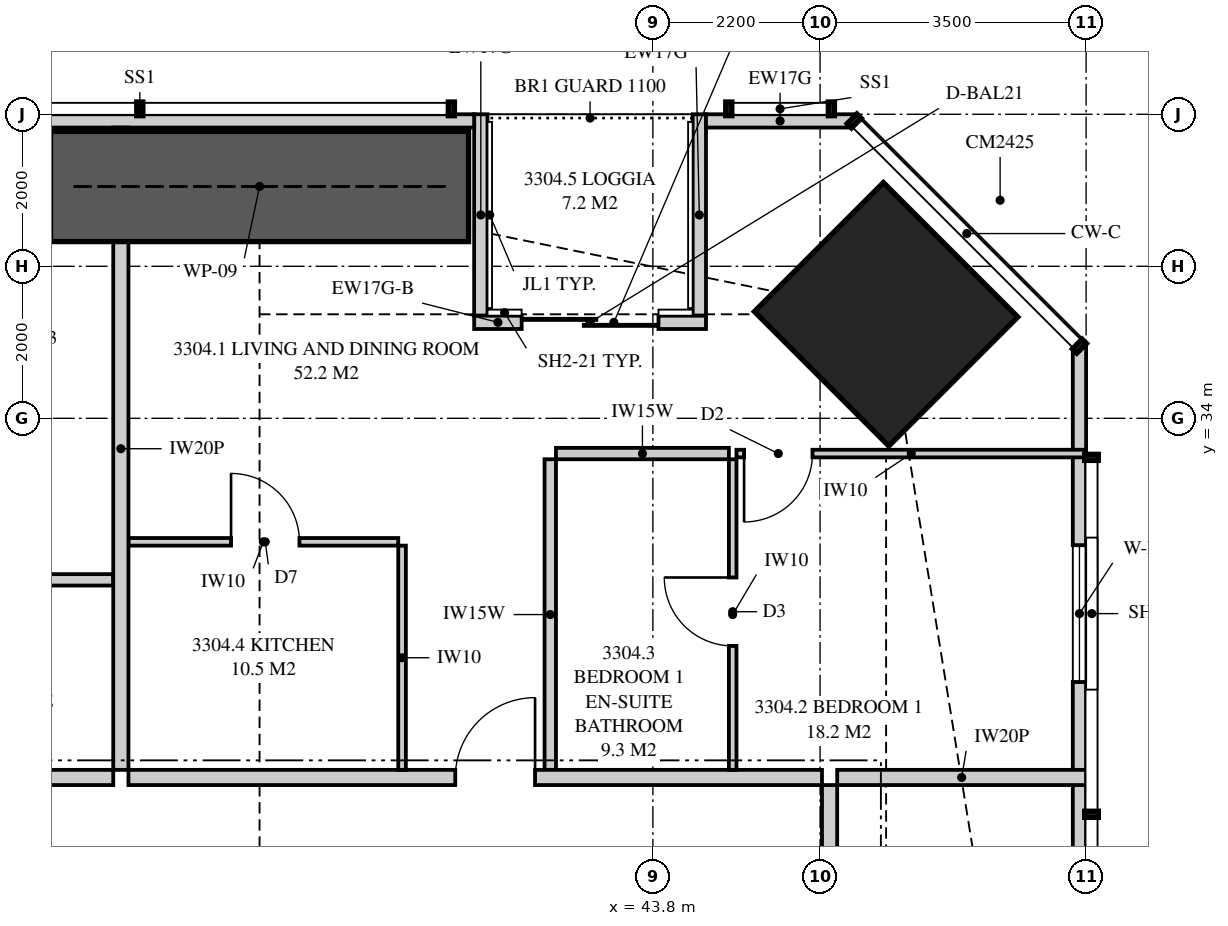
"""IFC4 building model, lengths in metres.
Left out: names, types, materials, properties, quantities, classifications, styles, units other than length and angle.
Written with IfcOpenShell. Run it as: python <this file> out.ifc"""

import sys

from ifc_helpers import new_model, si_unit, direction, frame, frame_2d, origin, origin_2d, place, context, subcontext, project, spatial, polyline, rectangle, outline, extrude, element, fill, save


model = new_model("IFC4")
c1 = context("Model", 3, precision=1e-05, world=origin(), true_north=direction((0.0, 1.0)))
c2 = subcontext(c1, "Body", "Model", "MODEL_VIEW")
j1 = project(units=[si_unit("LENGTHUNIT", "METRE"), si_unit("PLANEANGLEUNIT", "RADIAN")], contexts=[c1])
p1 = place(None, origin())
s1 = spatial("IfcSite", under=j1, at=p1, CompositionType="ELEMENT")
p2 = place(p1, origin())
s2 = spatial("IfcBuilding", under=s1, at=p2, CompositionType="ELEMENT")
p3 = place(p2, frame((0.0, 0.0, 121.6)))
s3 = spatial("IfcBuildingStorey", under=s2, at=p3, CompositionType="ELEMENT", Elevation=121.6)
p4 = place(p3, frame((46.869, 35.369, 0.0), z_axis=(0.0, 0.0, 1.0), x_axis=(-0.707106781187, -0.707106781187, 0.0)))
e1 = element("IfcColumn", 1, at=p4, inside=s3, PredefinedType="COLUMN", context=c2, shape_type="SweptSolid", body=[
    extrude(rectangle(XDim=2.4, YDim=2.5, at=origin_2d()), origin(), (0.0, 0.0, 1.0), 3.35),
])
p5 = place(p3, frame((49.413, 3.051, 0.0), z_axis=(0.0, 0.0, 1.0), x_axis=(0.0, 1.0, 0.0)))
e2 = element("IfcWall", 2, at=p5, inside=s3, PredefinedType="SOLIDWALL", context=c2, shape_type="SweptSolid", body=[
    extrude(outline(polyline([(0.0, 0.0), (31.897, 0.0), (31.897, 3.11), (22.167, 3.11), (22.167, 2.15), (22.074, 2.15), (22.074, 3.11), (21.949, 3.11), (21.949, 2.15), (9.949, 2.15), (9.949, 3.11), (9.823, 3.11), (9.823, 2.15), (9.73, 2.15), (9.73, 3.11), (0.0, 3.11), (0.0, 0.0)])), frame((0.0, 0.087, 0.0), z_axis=(0.0, -1.0, 0.0), x_axis=(1.0, 0.0, 0.0)), (0.0, 0.0, 1.0), 0.175),
])
p6 = place(p5, frame((2.118, 0.0, 0.4)))
e3 = element("IfcOpeningElement", 3, at=p6, cuts=e2, PredefinedType="OPENING", context=c2, shape_type="SweptSolid", body=[
    extrude(rectangle(XDim=1.8, YDim=1.7, at=frame_2d((0.9, 0.85))), frame((0.0, 0.097, 0.0), z_axis=(0.0, -1.0, 0.0), x_axis=(1.0, 0.0, 0.0)), (0.0, 0.0, 1.0), 0.195),
])
p7 = place(p5, frame((14.849, 0.0, 0.4)))
e4 = element("IfcOpeningElement", 4, at=p7, cuts=e2, PredefinedType="OPENING", context=c2, shape_type="SweptSolid", body=[
    extrude(rectangle(XDim=1.2, YDim=1.7, at=frame_2d((0.6, 0.85))), frame((0.0, 0.097, 0.0), z_axis=(0.0, -1.0, 0.0), x_axis=(1.0, 0.0, 0.0)), (0.0, 0.0, 1.0), 0.195),
])
p8 = place(p5, frame((27.479, 0.0, 0.4)))
e5 = element("IfcOpeningElement", 5, at=p8, cuts=e2, PredefinedType="OPENING", context=c2, shape_type="SweptSolid", body=[
    extrude(rectangle(XDim=1.8, YDim=1.7, at=frame_2d((0.9, 0.85))), frame((0.0, 0.097, 0.0), z_axis=(0.0, -1.0, 0.0), x_axis=(1.0, 0.0, 0.0)), (0.0, 0.0, 1.0), 0.195),
])
p9 = place(p3, frame((46.449, 37.913, 0.0), z_axis=(0.0, 0.0, 1.0), x_axis=(-1.0, 0.0, 0.0)))
e6 = element("IfcWall", 6, at=p9, inside=s3, PredefinedType="SOLIDWALL", context=c2, shape_type="SweptSolid", body=[
    extrude(rectangle(XDim=1.95, YDim=0.175, at=frame_2d((0.975, 0.0))), origin(), (0.0, 0.0, 1.0), 3.11),
])
p10 = place(p3, frame((41.449, 37.913, 0.0), z_axis=(0.0, 0.0, 1.0), x_axis=(-1.0, 0.0, 0.0)))
e7 = element("IfcWall", 7, at=p10, inside=s3, PredefinedType="SOLIDWALL", context=c2, shape_type="SweptSolid", body=[
    extrude(outline(polyline([(0.0, 0.0), (27.374, 0.0), (27.374, 3.11), (24.777, 3.11), (24.777, 2.15), (24.732, 2.15), (24.732, 3.11), (24.574, 3.11), (24.574, 2.15), (2.824, 2.15), (2.824, 3.11), (2.666, 3.11), (2.666, 2.15), (2.62, 2.15), (2.62, 3.11), (0.0, 3.11), (0.0, 0.0)])), frame((0.0, 0.087, 0.0), z_axis=(0.0, -1.0, 0.0), x_axis=(1.0, 0.0, 0.0)), (0.0, 0.0, 1.0), 0.175),
])
p11 = place(p10, frame((5.699, 0.0, 0.4)))
e8 = element("IfcOpeningElement", 8, at=p11, cuts=e7, PredefinedType="OPENING", context=c2, shape_type="SweptSolid", body=[
    extrude(rectangle(XDim=1.8, YDim=1.7, at=frame_2d((0.9, 0.85))), frame((0.0, 0.097, 0.0), z_axis=(0.0, -1.0, 0.0), x_axis=(1.0, 0.0, 0.0)), (0.0, 0.0, 1.0), 0.195),
])
p12 = place(p10, frame((9.034, 0.0, 0.4)))
e9 = element("IfcOpeningElement", 9, at=p12, cuts=e7, PredefinedType="OPENING", context=c2, shape_type="SweptSolid", body=[
    extrude(rectangle(XDim=1.8, YDim=1.7, at=frame_2d((0.9, 0.85))), frame((0.0, 0.097, 0.0), z_axis=(0.0, -1.0, 0.0), x_axis=(1.0, 0.0, 0.0)), (0.0, 0.0, 1.0), 0.195),
])
p13 = place(p10, frame((16.558, 0.0, 0.4)))
e10 = element("IfcOpeningElement", 10, at=p13, cuts=e7, PredefinedType="OPENING", context=c2, shape_type="SweptSolid", body=[
    extrude(rectangle(XDim=1.8, YDim=1.7, at=frame_2d((0.9, 0.85))), frame((0.0, 0.097, 0.0), z_axis=(0.0, -1.0, 0.0), x_axis=(1.0, 0.0, 0.0)), (0.0, 0.0, 1.0), 0.195),
])
p14 = place(p10, frame((19.724, 0.0, 0.4)))
e11 = element("IfcOpeningElement", 11, at=p14, cuts=e7, PredefinedType="OPENING", context=c2, shape_type="SweptSolid", body=[
    extrude(rectangle(XDim=1.8, YDim=1.7, at=frame_2d((0.9, 0.85))), frame((0.0, 0.097, 0.0), z_axis=(0.0, -1.0, 0.0), x_axis=(1.0, 0.0, 0.0)), (0.0, 0.0, 1.0), 0.195),
])
p15 = place(p3, frame((44.499, 35.262, 0.0), z_axis=(0.0, 0.0, 1.0), x_axis=(-1.0, 0.0, 0.0)))
e12 = element("IfcWall", 12, at=p15, inside=s3, PredefinedType="SOLIDWALL", context=c2, shape_type="SweptSolid", body=[
    extrude(rectangle(XDim=2.425, YDim=0.175, at=frame_2d((1.212, 0.0))), origin(), (0.0, 0.0, 1.0), 2.15),
])
p16 = place(p15, frame((0.625, 0.0, 0.0)))
e13 = element("IfcOpeningElement", 13, at=p16, cuts=e12, PredefinedType="OPENING", context=c2, shape_type="SweptSolid", body=[
    extrude(rectangle(XDim=1.8, YDim=2.1, at=frame_2d((0.9, 1.05))), frame((0.0, 0.097, 0.0), z_axis=(0.0, -1.0, 0.0), x_axis=(1.0, 0.0, 0.0)), (0.0, 0.0, 1.0), 0.195),
])
p17 = place(p3, frame((42.074, 35.262, 0.0), z_axis=(0.0, 0.0, 1.0), x_axis=(-1.0, 0.0, 0.0)))
e14 = element("IfcWall", 14, at=p17, inside=s3, PredefinedType="SOLIDWALL", context=c2, shape_type="SweptSolid", body=[
    extrude(rectangle(XDim=0.625, YDim=0.175, at=frame_2d((0.312, 0.0))), origin(), (0.0, 0.0, 1.0), 2.51),
])
p18 = place(p3, frame((44.411, 38.0, 0.0), z_axis=(0.0, 0.0, 1.0), x_axis=(0.0, -1.0, 0.0)))
e15 = element("IfcWall", 15, at=p18, inside=s3, PredefinedType="SOLIDWALL", context=c2, shape_type="SweptSolid", body=[
    extrude(outline(polyline([(0.0, 0.0), (2.65, 0.0), (2.65, 2.15), (1.296, 2.15), (1.296, 3.11), (0.0, 3.11), (0.0, 0.0)])), frame((0.0, 0.087, 0.0), z_axis=(0.0, -1.0, 0.0), x_axis=(1.0, 0.0, 0.0)), (0.0, 0.0, 1.0), 0.175),
])
p19 = place(p3, frame((41.536, 38.0, 0.0), z_axis=(0.0, 0.0, 1.0), x_axis=(0.0, -1.0, 0.0)))
e16 = element("IfcWall", 16, at=p19, inside=s3, PredefinedType="SOLIDWALL", context=c2, shape_type="SweptSolid", body=[
    extrude(outline(polyline([(0.0, 0.0), (2.65, 0.0), (2.65, 2.51), (2.378, 2.51), (2.378, 2.15), (0.709, 2.15), (0.709, 3.11), (0.0, 3.11), (0.0, 0.0)])), frame((0.0, 0.087, 0.0), z_axis=(0.0, -1.0, 0.0), x_axis=(1.0, 0.0, 0.0)), (0.0, 0.0, 1.0), 0.175),
])
p20 = place(p3, frame((36.8, 37.825, 0.0), z_axis=(0.0, 0.0, 1.0), x_axis=(0.0, -1.0, 0.0)))
e17 = element("IfcWall", 17, at=p20, inside=s3, PredefinedType="PARTITIONING", context=c2, shape_type="SweptSolid", body=[
    extrude(outline(polyline([(0.529, 2.15), (0.0, 2.15), (0.0, 0.0), (0.529, 0.0), (0.529, 0.256), (1.021, 0.256), (1.021, 0.0), (8.45, 0.0), (8.45, 3.11), (1.685, 3.11), (1.685, 2.15), (1.021, 2.15), (1.021, 1.894), (0.529, 1.894), (0.529, 2.15)])), frame((0.0, 0.1, 0.0), z_axis=(0.0, -1.0, 0.0), x_axis=(1.0, 0.0, 0.0)), (0.0, 0.0, 1.0), 0.2),
])
p21 = place(p3, frame((17.775, 29.275, 0.0), z_axis=(0.0, 0.0, 1.0), x_axis=(1.0, 0.0, 0.0)))
e18 = element("IfcWall", 18, at=p21, inside=s3, PredefinedType="PARTITIONING", context=c2, shape_type="SweptSolid", body=[
    extrude(outline(polyline([(0.0, 0.0), (18.925, 0.0), (18.925, 3.11), (10.312, 3.11), (10.312, 2.541), (9.638, 2.541), (9.638, 3.11), (0.0, 3.11), (0.0, 0.0)])), frame((0.0, 0.1, 0.0), z_axis=(0.0, -1.0, 0.0), x_axis=(1.0, 0.0, 0.0)), (0.0, 0.0, 1.0), 0.2),
])
p22 = place(p21, frame((3.125, 0.0, 0.0)))
e19 = element("IfcOpeningElement", 19, at=p22, cuts=e18, PredefinedType="OPENING", context=c2, shape_type="SweptSolid", body=[
    extrude(rectangle(XDim=1.05, YDim=2.2, at=frame_2d((0.525, 1.1))), frame((0.0, 0.11, 0.0), z_axis=(0.0, -1.0, 0.0), x_axis=(1.0, 0.0, 0.0)), (0.0, 0.0, 1.0), 0.22),
])
p23 = place(p3, frame((32.95, 31.875, 0.0), z_axis=(0.0, 0.0, 1.0), x_axis=(1.0, 0.0, 0.0)))
e20 = element("IfcWall", 20, at=p23, inside=s3, PredefinedType="PLUMBINGWALL", context=c2, shape_type="SweptSolid", body=[
    extrude(rectangle(XDim=3.75, YDim=0.15, at=frame_2d((1.875, 0.0))), origin(), (0.0, 0.0, 1.0), 3.11),
])
p24 = place(p23, frame((0.4, 0.0, 0.0)))
e21 = element("IfcOpeningElement", 21, at=p24, cuts=e20, PredefinedType="OPENING", context=c2, shape_type="SweptSolid", body=[
    extrude(rectangle(XDim=0.9, YDim=2.1, at=frame_2d((0.45, 1.05))), frame((0.0, 0.085, 0.0), z_axis=(0.0, -1.0, 0.0), x_axis=(1.0, 0.0, 0.0)), (0.0, 0.0, 1.0), 0.17),
])
p25 = place(p3, frame((36.9, 29.275, 0.0), z_axis=(0.0, 0.0, 1.0), x_axis=(1.0, 0.0, 0.0)))
e22 = element("IfcWall", 22, at=p25, inside=s3, PredefinedType="PARTITIONING", context=c2, shape_type="SweptSolid", body=[
    extrude(outline(polyline([(0.0, 0.0), (9.125, 0.0), (9.125, 3.11), (2.062, 3.11), (2.062, 2.541), (1.388, 2.541), (1.388, 3.11), (0.0, 3.11), (0.0, 0.0)])), frame((0.0, 0.1, 0.0), z_axis=(0.0, -1.0, 0.0), x_axis=(1.0, 0.0, 0.0)), (0.0, 0.0, 1.0), 0.2),
])
p26 = place(p25, frame((4.3, 0.0, 0.0)))
e23 = element("IfcOpeningElement", 23, at=p26, cuts=e22, PredefinedType="OPENING", context=c2, shape_type="SweptSolid", body=[
    extrude(rectangle(XDim=1.05, YDim=2.2, at=frame_2d((0.525, 1.1))), frame((0.0, 0.11, 0.0), z_axis=(0.0, -1.0, 0.0), x_axis=(1.0, 0.0, 0.0)), (0.0, 0.0, 1.0), 0.22),
])
p27 = place(p3, frame((44.85, 33.461, 0.0), z_axis=(0.0, 0.0, 1.0), x_axis=(0.0, -1.0, 0.0)))
e24 = element("IfcWall", 24, at=p27, inside=s3, PredefinedType="PARTITIONING", context=c2, shape_type="SweptSolid", body=[
    extrude(rectangle(XDim=4.086, YDim=0.1, at=frame_2d((2.043, 0.0))), origin(), (0.0, 0.0, 1.0), 3.11),
])
p28 = place(p27, frame((1.556, 0.0, 0.0)))
e25 = element("IfcOpeningElement", 25, at=p28, cuts=e24, PredefinedType="OPENING", context=c2, shape_type="SweptSolid", body=[
    extrude(rectangle(XDim=0.9, YDim=2.1, at=frame_2d((0.45, 1.05))), frame((0.0, 0.06, 0.0), z_axis=(0.0, -1.0, 0.0), x_axis=(1.0, 0.0, 0.0)), (0.0, 0.0, 1.0), 0.12),
])
p29 = place(p3, frame((44.9, 33.536, 0.0), z_axis=(0.0, 0.0, 1.0), x_axis=(1.0, 0.0, 0.0)))
e26 = element("IfcWall", 26, at=p29, inside=s3, PredefinedType="PARTITIONING", context=c2, shape_type="SweptSolid", body=[
    extrude(outline(polyline([(0.0, 0.0), (4.6, 0.0), (4.6, 3.11), (3.137, 3.11), (3.137, 2.15), (1.395, 2.15), (1.395, 3.11), (0.0, 3.11), (0.0, 0.0)])), frame((0.0, 0.05, 0.0), z_axis=(0.0, -1.0, 0.0), x_axis=(1.0, 0.0, 0.0)), (0.0, 0.0, 1.0), 0.1),
])
p30 = place(p29, frame((0.1, 0.0, 0.0)))
e27 = element("IfcOpeningElement", 27, at=p30, cuts=e26, PredefinedType="OPENING", context=c2, shape_type="SweptSolid", body=[
    extrude(rectangle(XDim=0.9, YDim=2.1, at=frame_2d((0.45, 1.05))), frame((0.0, 0.06, 0.0), z_axis=(0.0, -1.0, 0.0), x_axis=(1.0, 0.0, 0.0)), (0.0, 0.0, 1.0), 0.12),
])
p31 = place(p3, frame((42.525, 33.536, 0.0), z_axis=(0.0, 0.0, 1.0), x_axis=(1.0, 0.0, 0.0)))
e28 = element("IfcWall", 28, at=p31, inside=s3, PredefinedType="PLUMBINGWALL", context=c2, shape_type="SweptSolid", body=[
    extrude(rectangle(XDim=2.275, YDim=0.15, at=frame_2d((1.138, 0.0))), origin(), (0.0, 0.0, 1.0), 3.11),
])
p32 = place(p3, frame((42.45, 33.461, 0.0), z_axis=(0.0, 0.0, 1.0), x_axis=(0.0, -1.0, 0.0)))
e29 = element("IfcWall", 29, at=p32, inside=s3, PredefinedType="PLUMBINGWALL", context=c2, shape_type="SweptSolid", body=[
    extrude(rectangle(XDim=4.086, YDim=0.15, at=frame_2d((2.043, 0.0))), origin(), (0.0, 0.0, 1.0), 3.11),
])
p33 = place(p3, frame((36.9, 32.375, 0.0), z_axis=(0.0, 0.0, 1.0), x_axis=(1.0, 0.0, 0.0)))
e30 = element("IfcWall", 30, at=p33, inside=s3, PredefinedType="PARTITIONING", context=c2, shape_type="SweptSolid", body=[
    extrude(outline(polyline([(0.0, 0.0), (3.55, 0.0), (3.55, 3.11), (2.012, 3.11), (2.012, 2.541), (1.438, 2.541), (1.438, 3.11), (0.0, 3.11), (0.0, 0.0)])), frame((0.0, 0.05, 0.0), z_axis=(0.0, -1.0, 0.0), x_axis=(1.0, 0.0, 0.0)), (0.0, 0.0, 1.0), 0.1),
])
p34 = place(p33, frame((1.35, 0.0, 0.0)))
e31 = element("IfcOpeningElement", 31, at=p34, cuts=e30, PredefinedType="OPENING", context=c2, shape_type="SweptSolid", body=[
    extrude(rectangle(XDim=0.9, YDim=2.1, at=frame_2d((0.45, 1.05))), frame((0.0, 0.06, 0.0), z_axis=(0.0, -1.0, 0.0), x_axis=(1.0, 0.0, 0.0)), (0.0, 0.0, 1.0), 0.12),
])
p35 = place(p3, frame((40.5, 32.325, 0.0), z_axis=(0.0, 0.0, 1.0), x_axis=(0.0, -1.0, 0.0)))
e32 = element("IfcWall", 32, at=p35, inside=s3, PredefinedType="PARTITIONING", context=c2, shape_type="SweptSolid", body=[
    extrude(rectangle(XDim=2.95, YDim=0.1, at=frame_2d((1.475, 0.0))), origin(), (0.0, 0.0, 1.0), 3.11),
])
p36 = place(p3, frame((46.225, 29.275, 0.0), z_axis=(0.0, 0.0, 1.0), x_axis=(1.0, 0.0, 0.0)))
e33 = element("IfcWall", 33, at=p36, inside=s3, PredefinedType="PARTITIONING", context=c2, shape_type="SweptSolid", body=[
    extrude(outline(polyline([(0.0, 0.0), (3.275, 0.0), (3.275, 3.11), (2.554, 3.11), (2.554, 2.15), (0.805, 2.15), (0.805, 2.541), (0.306, 2.541), (0.306, 3.11), (0.0, 3.11), (0.0, 0.0)])), frame((0.0, 0.1, 0.0), z_axis=(0.0, -1.0, 0.0), x_axis=(1.0, 0.0, 0.0)), (0.0, 0.0, 1.0), 0.2),
])
p37 = place(p3, frame((46.125, 20.7, 0.0), z_axis=(0.0, 0.0, 1.0), x_axis=(0.0, 1.0, 0.0)))
e34 = element("IfcWall", 34, at=p37, inside=s3, PredefinedType="PARTITIONING", context=c2, shape_type="SweptSolid", body=[
    extrude(outline(polyline([(0.0, 0.0), (8.475, 0.0), (8.475, 3.11), (4.637, 3.11), (4.637, 2.541), (3.963, 2.541), (3.963, 3.11), (0.0, 3.11), (0.0, 0.0)])), frame((0.0, 0.1, 0.0), z_axis=(0.0, -1.0, 0.0), x_axis=(1.0, 0.0, 0.0)), (0.0, 0.0, 1.0), 0.2),
])
p38 = place(p37, frame((6.625, 0.0, 0.0)))
e35 = element("IfcOpeningElement", 35, at=p38, cuts=e34, PredefinedType="OPENING", context=c2, shape_type="SweptSolid", body=[
    extrude(rectangle(XDim=1.0, YDim=2.1, at=frame_2d((0.5, 1.05))), frame((0.0, 0.11, 0.0), z_axis=(0.0, -1.0, 0.0), x_axis=(1.0, 0.0, 0.0)), (0.0, 0.0, 1.0), 0.22),
])
p39 = place(p3, frame((35.875, 37.05, 0.0), z_axis=(0.0, 0.0, 1.0), x_axis=(1.0, 0.0, 0.0)))
e36 = element("IfcWall", 36, at=p39, inside=s3, PredefinedType="SHEAR", context=c2, shape_type="SweptSolid", body=[
    extrude(rectangle(XDim=5.5, YDim=1.45, at=frame_2d((2.75, 0.0))), origin(), (0.0, 0.0, 1.0), 3.35),
])
p40 = place(p8, origin())
e37 = element("IfcWindow", 37, at=p40, inside=s3, PartitioningType="SINGLE_PANEL", PredefinedType="WINDOW", context=c2, shape_type="SweptSolid", body=[
    extrude(rectangle(XDim=1.8, YDim=1.7, at=frame_2d((0.9, 0.85))), frame((0.0, 0.03, 0.0), z_axis=(0.0, -1.0, 0.0), x_axis=(1.0, 0.0, 0.0)), (0.0, 0.0, 1.0), 0.06),
])
fill(e5, e37)
p41 = place(p16, origin())
e38 = element("IfcDoor", 38, at=p41, inside=s3, OperationType="SLIDING_TO_LEFT", PredefinedType="DOOR", context=c2, shape_type="SweptSolid", body=[
    extrude(rectangle(XDim=1.8, YDim=2.1, at=frame_2d((0.9, 1.05))), frame((0.0, 0.025, 0.0), z_axis=(0.0, -1.0, 0.0), x_axis=(1.0, 0.0, 0.0)), (0.0, 0.0, 1.0), 0.05),
])
fill(e13, e38)
p42 = place(p26, origin())
e39 = element("IfcDoor", 39, at=p42, inside=s3, OperationType="SINGLE_SWING_RIGHT", PredefinedType="DOOR", context=c2, shape_type="SweptSolid", body=[
    extrude(rectangle(XDim=1.05, YDim=2.2, at=frame_2d((0.525, 1.1))), frame((0.0, 0.025, 0.0), z_axis=(0.0, -1.0, 0.0), x_axis=(1.0, 0.0, 0.0)), (0.0, 0.0, 1.0), 0.05),
])
fill(e23, e39)
p43 = place(p30, frame((0.9, 0.0, 0.0), z_axis=(0.0, 0.0, 1.0), x_axis=(-1.0, 0.0, 0.0)))
e40 = element("IfcDoor", 40, at=p43, inside=s3, OperationType="SINGLE_SWING_RIGHT", PredefinedType="DOOR", context=c2, shape_type="SweptSolid", body=[
    extrude(rectangle(XDim=0.9, YDim=2.1, at=frame_2d((0.45, 1.05))), frame((0.0, 0.025, 0.0), z_axis=(0.0, -1.0, 0.0), x_axis=(1.0, 0.0, 0.0)), (0.0, 0.0, 1.0), 0.05),
])
fill(e27, e40)
p44 = place(p28, frame((0.9, 0.0, 0.0), z_axis=(0.0, 0.0, 1.0), x_axis=(-1.0, 0.0, 0.0)))
e41 = element("IfcDoor", 41, at=p44, inside=s3, OperationType="SINGLE_SWING_RIGHT", PredefinedType="DOOR", context=c2, shape_type="SweptSolid", body=[
    extrude(rectangle(XDim=0.9, YDim=2.1, at=frame_2d((0.45, 1.05))), frame((0.0, 0.025, 0.0), z_axis=(0.0, -1.0, 0.0), x_axis=(1.0, 0.0, 0.0)), (0.0, 0.0, 1.0), 0.05),
])
fill(e25, e41)
p45 = place(p34, origin())
e42 = element("IfcDoor", 42, at=p45, inside=s3, OperationType="SINGLE_SWING_LEFT", PredefinedType="DOOR", context=c2, shape_type="SweptSolid", body=[
    extrude(rectangle(XDim=0.9, YDim=2.1, at=frame_2d((0.45, 1.05))), frame((0.0, 0.025, 0.0), z_axis=(0.0, -1.0, 0.0), x_axis=(1.0, 0.0, 0.0)), (0.0, 0.0, 1.0), 0.05),
])
fill(e31, e42)
save(model, sys.argv[1])
